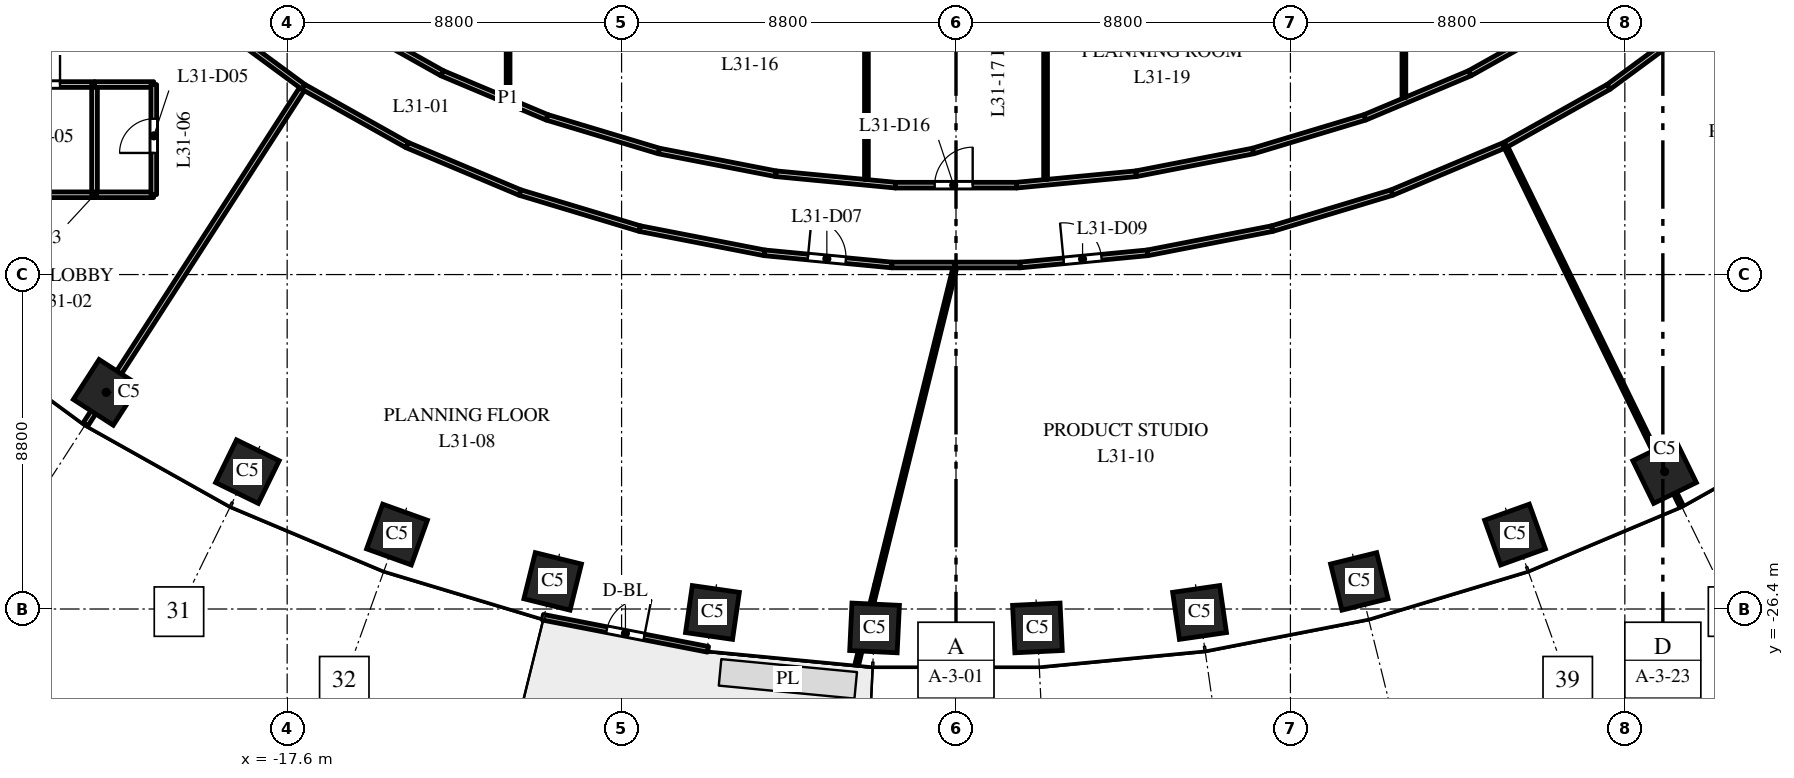
"""IFC4 building model, lengths in metres.
Left out: names, types, materials, properties, quantities, classifications, styles, units other than length and angle.
Written with IfcOpenShell. Run it as: python <this file> out.ifc"""

import sys

from ifc_helpers import new_model, si_unit, direction, frame, frame_2d, origin, origin_2d, place, context, subcontext, project, spatial, rectangle, extrude, element, fill, save


model = new_model("IFC4")
c1 = context("Model", 3, precision=1e-05, world=origin(), true_north=direction((0.0, 1.0)))
c2 = subcontext(c1, "Body", "Model", "MODEL_VIEW")
j1 = project(units=[si_unit("LENGTHUNIT", "METRE"), si_unit("PLANEANGLEUNIT", "RADIAN")], contexts=[c1])
p1 = place(None, origin())
s1 = spatial("IfcSite", under=j1, at=p1, CompositionType="ELEMENT")
p2 = place(p1, origin())
s2 = spatial("IfcBuilding", under=s1, at=p2, CompositionType="ELEMENT")
p3 = place(p2, frame((0.0, 0.0, 136.0)))
s3 = spatial("IfcBuildingStorey", under=s2, at=p3, CompositionType="ELEMENT", Elevation=136.0)
for number, where, z_axis, x_axis in (
    (1, (-22.362, -20.7, 0.0), (0.0, 0.0, 1.0), (0.84, -0.542, 0.0)),
    (2, (-18.646, -22.785, 0.0), (0.0, 0.0, 1.0), (0.898, -0.439, 0.0)),
    (3, (-14.709, -24.441, 0.0), (0.0, 0.0, 1.0), (0.941, -0.338, 0.0)),
    (4, (-10.613, -25.674, 0.0), (0.0, 0.0, 1.0), (0.971, -0.24, 0.0)),
    (5, (-6.409, -26.491, 0.0), (0.0, 0.0, 1.0), (0.99, -0.143, 0.0)),
    (6, (-2.143, -26.898, 0.0), (0.0, 0.0, 1.0), (0.999, -0.048, 0.0)),
    (7, (2.143, -26.898, 0.0), (0.0, 0.0, 1.0), (0.999, 0.048, 0.0)),
    (8, (6.409, -26.491, 0.0), (0.0, 0.0, 1.0), (0.99, 0.143, 0.0)),
    (9, (10.613, -25.674, 0.0), (0.0, 0.0, 1.0), (0.971, 0.24, 0.0)),
    (10, (14.709, -24.441, 0.0), (0.0, 0.0, 1.0), (0.941, 0.338, 0.0)),
    (11, (18.646, -22.785, 0.0), (0.0, 0.0, 1.0), (0.898, 0.439, 0.0)),
):
    element("IfcColumn", number, at=place(p3, frame(where, z_axis=z_axis, x_axis=x_axis)), inside=s3, PredefinedType="COLUMN", context=c2, shape_type="SweptSolid", body=[
        extrude(rectangle(XDim=1.25, YDim=1.25, at=origin_2d()), origin(), (0.0, 0.0, 1.0), 4.0),
    ])
p4 = place(p3, frame((-10.871, -26.617, 0.0), z_axis=(0.0, 0.0, 1.0), x_axis=(0.981631174778, -0.190788460615, 0.0)))
e12 = element("IfcWall", 12, at=p4, inside=s3, PredefinedType="STANDARD", context=c2, shape_type="SweptSolid", body=[
    extrude(rectangle(XDim=4.426, YDim=0.15, at=frame_2d((2.213, 0.0))), origin(), (0.0, 0.0, 1.0), 3.7),
])
p5 = place(p4, frame((1.713, 0.0, 0.0)))
e13 = element("IfcOpeningElement", 13, at=p5, cuts=e12, PredefinedType="OPENING", context=c2, shape_type="SweptSolid", body=[
    extrude(rectangle(XDim=1.0, YDim=2.4, at=frame_2d((0.5, 1.2))), frame((0.0, 0.085, 0.0), z_axis=(0.0, -1.0, 0.0), x_axis=(1.0, 0.0, 0.0)), (0.0, 0.0, 1.0), 0.17),
])
p6 = place(p3, frame((-32.063, -12.6, 0.0), z_axis=(0.0, 0.0, 1.0), x_axis=(1.0, 0.0, 0.0)))
e14 = element("IfcWall", 14, at=p6, inside=s3, PredefinedType="PARTITIONING", context=c2, shape_type="SweptSolid", body=[
    extrude(rectangle(XDim=9.394, YDim=0.15, at=frame_2d((4.697, 0.0))), origin(), (0.0, 0.0, 1.0), 2.9),
])
p7 = place(p6, frame((1.713, 0.0, 0.0)))
e15 = element("IfcOpeningElement", 15, at=p7, cuts=e14, PredefinedType="OPENING", context=c2, shape_type="SweptSolid", body=[
    extrude(rectangle(XDim=1.0, YDim=2.1, at=frame_2d((0.5, 1.05))), frame((0.0, 0.085, 0.0), z_axis=(0.0, -1.0, 0.0), x_axis=(1.0, 0.0, 0.0)), (0.0, 0.0, 1.0), 0.17),
])
p8 = place(p6, frame((7.486, 0.0, 0.0)))
e16 = element("IfcOpeningElement", 16, at=p8, cuts=e14, PredefinedType="OPENING", context=c2, shape_type="SweptSolid", body=[
    extrude(rectangle(XDim=1.0, YDim=2.1, at=frame_2d((0.5, 1.05))), frame((0.0, 0.085, 0.0), z_axis=(0.0, -1.0, 0.0), x_axis=(1.0, 0.0, 0.0)), (0.0, 0.0, 1.0), 0.17),
])
p9 = place(p3, frame((-29.865, -15.5, 0.0), z_axis=(0.0, 0.0, 1.0), x_axis=(1.0, 0.0, 0.0)))
e17 = element("IfcWall", 17, at=p9, inside=s3, PredefinedType="PARTITIONING", context=c2, shape_type="SweptSolid", body=[
    extrude(rectangle(XDim=7.196, YDim=0.15, at=frame_2d((3.598, 0.0))), origin(), (0.0, 0.0, 1.0), 2.9),
])
p10 = place(p9, frame((2.488, 0.0, 0.0)))
e18 = element("IfcOpeningElement", 18, at=p10, cuts=e17, PredefinedType="OPENING", context=c2, shape_type="SweptSolid", body=[
    extrude(rectangle(XDim=1.0, YDim=2.1, at=frame_2d((0.5, 1.05))), frame((0.0, 0.085, 0.0), z_axis=(0.0, -1.0, 0.0), x_axis=(1.0, 0.0, 0.0)), (0.0, 0.0, 1.0), 0.17),
])
p11 = place(p3, frame((-22.905, -21.542, 0.0), z_axis=(0.0, 0.0, 1.0), x_axis=(0.542214233103, 0.840240278385, 0.0)))
e19 = element("IfcWall", 19, at=p11, inside=s3, PredefinedType="PARTITIONING", context=c2, shape_type="SweptSolid", body=[
    extrude(rectangle(XDim=10.566, YDim=0.15, at=frame_2d((5.283, 0.0))), origin(), (0.0, 0.0, 1.0), 2.9),
])
p12 = place(p3, frame((-22.669, -15.5, 0.0), z_axis=(0.0, 0.0, 1.0), x_axis=(0.0, 1.0, 0.0)))
e20 = element("IfcWall", 20, at=p12, inside=s3, PredefinedType="PARTITIONING", context=c2, shape_type="SweptSolid", body=[
    extrude(rectangle(XDim=2.9, YDim=0.15, at=frame_2d((1.45, 0.0))), origin(), (0.0, 0.0, 1.0), 3.7),
])
p13 = place(p3, frame((-22.669, -15.5, 0.0), z_axis=(0.0, 0.0, 1.0), x_axis=(1.0, 0.0, 0.0)))
e21 = element("IfcWall", 21, at=p13, inside=s3, PredefinedType="PARTITIONING", context=c2, shape_type="SweptSolid", body=[
    extrude(rectangle(XDim=1.555, YDim=0.15, at=frame_2d((0.777, 0.0))), origin(), (0.0, 0.0, 1.0), 2.75),
])
p14 = place(p3, frame((-22.669, -12.6, 0.0), z_axis=(0.0, 0.0, 1.0), x_axis=(1.0, 0.0, 0.0)))
e22 = element("IfcWall", 22, at=p14, inside=s3, PredefinedType="PARTITIONING", context=c2, shape_type="SweptSolid", body=[
    extrude(rectangle(XDim=1.559, YDim=0.15, at=frame_2d((0.779, 0.0))), origin(), (0.0, 0.0, 1.0), 3.7),
])
p15 = place(p3, frame((-21.11, -15.496, 0.0), z_axis=(0.0, 0.0, 1.0), x_axis=(0.0, 1.0, 0.0)))
e23 = element("IfcWall", 23, at=p15, inside=s3, PredefinedType="PARTITIONING", context=c2, shape_type="SweptSolid", body=[
    extrude(rectangle(XDim=2.896, YDim=0.15, at=frame_2d((1.448, 0.0))), origin(), (0.0, 0.0, 1.0), 2.75),
])
p16 = place(p15, frame((1.096, 0.0, 0.0)))
e24 = element("IfcOpeningElement", 24, at=p16, cuts=e23, PredefinedType="OPENING", context=c2, shape_type="SweptSolid", body=[
    extrude(rectangle(XDim=0.9, YDim=2.1, at=frame_2d((0.45, 1.05))), frame((0.0, 0.085, 0.0), z_axis=(0.0, -1.0, 0.0), x_axis=(1.0, 0.0, 0.0)), (0.0, 0.0, 1.0), 0.17),
])
p17 = place(p3, frame((-19.595, -10.877, 0.0), z_axis=(0.0, 0.0, 1.0), x_axis=(0.805151708762, -0.593068904831, 0.0)))
e25 = element("IfcWall", 25, at=p17, inside=s3, PredefinedType="PARTITIONING", context=c2, shape_type="SweptSolid", body=[
    extrude(rectangle(XDim=3.008, YDim=0.15, at=frame_2d((1.504, 0.0))), origin(), (0.0, 0.0, 1.0), 2.75),
])
p18 = place(p3, frame((-17.173, -12.661, 0.0), z_axis=(0.0, 0.0, 1.0), x_axis=(0.872054495499, -0.489408783003, 0.0)))
e26 = element("IfcWall", 26, at=p18, inside=s3, PredefinedType="PARTITIONING", context=c2, shape_type="SweptSolid", body=[
    extrude(rectangle(XDim=3.128, YDim=0.15, at=frame_2d((1.564, 0.0))), origin(), (0.0, 0.0, 1.0), 3.7),
])
p19 = place(p3, frame((-16.032, -10.893, 0.0), z_axis=(0.0, 0.0, 1.0), x_axis=(0.871948863789, -0.489596955604, 0.0)))
e27 = element("IfcWall", 27, at=p19, inside=s3, PredefinedType="PARTITIONING", context=c2, shape_type="SweptSolid", body=[
    extrude(rectangle(XDim=2.88, YDim=0.15, at=frame_2d((1.44, 0.0))), origin(), (0.0, 0.0, 1.0), 2.75),
])
p20 = place(p3, frame((-14.445, -14.192, 0.0), z_axis=(0.0, 0.0, 1.0), x_axis=(0.921794929211, -0.387677841101, 0.0)))
e28 = element("IfcWall", 28, at=p20, inside=s3, PredefinedType="PARTITIONING", context=c2, shape_type="SweptSolid", body=[
    extrude(rectangle(XDim=3.224, YDim=0.15, at=frame_2d((1.612, 0.0))), origin(), (0.0, 0.0, 1.0), 2.85),
])
p21 = place(p3, frame((-13.521, -12.303, 0.0), z_axis=(0.0, 0.0, 1.0), x_axis=(0.921848667289, -0.387550041438, 0.0)))
e29 = element("IfcWall", 29, at=p21, inside=s3, PredefinedType="PARTITIONING", context=c2, shape_type="SweptSolid", body=[
    extrude(rectangle(XDim=2.993, YDim=0.15, at=frame_2d((1.497, 0.0))), origin(), (0.0, 0.0, 1.0), 2.85),
])
p22 = place(p3, frame((-11.786, -12.947, 0.0), z_axis=(0.0, 0.0, 1.0), x_axis=(0.0, 1.0, 0.0)))
e30 = element("IfcWall", 30, at=p22, inside=s3, PredefinedType="PARTITIONING", context=c2, shape_type="SweptSolid", body=[
    extrude(rectangle(XDim=25.894, YDim=0.1, at=frame_2d((12.947, 0.0))), origin(), (0.0, 0.0, 1.0), 2.75),
])
p23 = place(p3, frame((-11.473, -15.442, 0.0), z_axis=(0.0, 0.0, 1.0), x_axis=(0.957544199748, -0.288286499041, 0.0)))
e31 = element("IfcWall", 31, at=p23, inside=s3, PredefinedType="PARTITIONING", context=c2, shape_type="SweptSolid", body=[
    extrude(rectangle(XDim=3.293, YDim=0.15, at=frame_2d((1.646, 0.0))), origin(), (0.0, 0.0, 1.0), 3.7),
])
p24 = place(p3, frame((-10.762, -13.463, 0.0), z_axis=(0.0, 0.0, 1.0), x_axis=(0.957609782402, -0.288068576292, 0.0)))
e32 = element("IfcWall", 32, at=p24, inside=s3, PredefinedType="PARTITIONING", context=c2, shape_type="SweptSolid", body=[
    extrude(rectangle(XDim=3.076, YDim=0.15, at=frame_2d((1.538, 0.0))), origin(), (0.0, 0.0, 1.0), 3.7),
])
p25 = place(p3, frame((-8.32, -16.391, 0.0), z_axis=(0.0, 0.0, 1.0), x_axis=(0.981650748697, -0.190687722683, 0.0)))
e33 = element("IfcWall", 33, at=p25, inside=s3, PredefinedType="PARTITIONING", context=c2, shape_type="SweptSolid", body=[
    extrude(rectangle(XDim=3.34, YDim=0.15, at=frame_2d((1.67, 0.0))), origin(), (0.0, 0.0, 1.0), 2.85),
])
p26 = place(p3, frame((-7.816, -14.349, 0.0), z_axis=(0.0, 0.0, 1.0), x_axis=(0.981627147181, -0.190809181955, 0.0)))
e34 = element("IfcWall", 34, at=p26, inside=s3, PredefinedType="PARTITIONING", context=c2, shape_type="SweptSolid", body=[
    extrude(rectangle(XDim=3.134, YDim=0.15, at=frame_2d((1.567, 0.0))), origin(), (0.0, 0.0, 1.0), 2.85),
])
p27 = place(p3, frame((-5.041, -17.028, 0.0), z_axis=(0.0, 0.0, 1.0), x_axis=(0.99548178004, -0.094952754613, 0.0)))
e35 = element("IfcWall", 35, at=p27, inside=s3, PredefinedType="PARTITIONING", context=c2, shape_type="SweptSolid", body=[
    extrude(rectangle(XDim=3.368, YDim=0.15, at=frame_2d((1.684, 0.0))), origin(), (0.0, 0.0, 1.0), 3.7),
])
p28 = place(p27, frame((1.15, 0.0, 0.0)))
e36 = element("IfcOpeningElement", 36, at=p28, cuts=e35, PredefinedType="OPENING", context=c2, shape_type="SweptSolid", body=[
    extrude(rectangle(XDim=1.0, YDim=2.1, at=frame_2d((0.5, 1.05))), frame((0.0, 0.085, 0.0), z_axis=(0.0, -1.0, 0.0), x_axis=(1.0, 0.0, 0.0)), (0.0, 0.0, 1.0), 0.17),
])
p29 = place(p3, frame((-4.74, -14.947, 0.0), z_axis=(0.0, 0.0, 1.0), x_axis=(0.995467349369, -0.095103923894, 0.0)))
e37 = element("IfcWall", 37, at=p29, inside=s3, PredefinedType="PARTITIONING", context=c2, shape_type="SweptSolid", body=[
    extrude(rectangle(XDim=3.165, YDim=0.15, at=frame_2d((1.583, 0.0))), origin(), (0.0, 0.0, 1.0), 3.7),
])
p30 = place(p3, frame((-2.609, -27.858, 0.0), z_axis=(0.0, 0.0, 1.0), x_axis=(0.239863692272, 0.970806576579, 0.0)))
e38 = element("IfcWall", 38, at=p30, inside=s3, PredefinedType="PARTITIONING", context=c2, shape_type="SweptSolid", body=[
    extrude(rectangle(XDim=2.151, YDim=0.1, at=frame_2d((1.075, 0.0))), origin(), (0.0, 0.0, 1.0), 2.85),
])
p31 = place(p3, frame((-2.357, -15.096, 0.0), z_axis=(0.0, 0.0, 1.0), x_axis=(0.0, 1.0, 0.0)))
e39 = element("IfcWall", 39, at=p31, inside=s3, PredefinedType="PARTITIONING", context=c2, shape_type="SweptSolid", body=[
    extrude(rectangle(XDim=7.886, YDim=0.1, at=frame_2d((3.943, 0.0))), origin(), (0.0, 0.0, 1.0), 2.9),
])
p32 = place(p3, frame((-2.088, -25.749, 0.0), z_axis=(0.0, 0.0, 1.0), x_axis=(0.239779759728, 0.970827310506, 0.0)))
e40 = element("IfcWall", 40, at=p32, inside=s3, PredefinedType="PARTITIONING", context=c2, shape_type="SweptSolid", body=[
    extrude(rectangle(XDim=8.654, YDim=0.1, at=frame_2d((4.327, 0.0))), origin(), (0.0, 0.0, 1.0), 2.85),
])
p33 = place(p3, frame((-1.688, -17.348, 0.0), z_axis=(0.0, 0.0, 1.0), x_axis=(1.0, 0.0, 0.0)))
e41 = element("IfcWall", 41, at=p33, inside=s3, PredefinedType="PARTITIONING", context=c2, shape_type="SweptSolid", body=[
    extrude(rectangle(XDim=1.658, YDim=0.15, at=frame_2d((0.829, 0.0))), origin(), (0.0, 0.0, 1.0), 2.85),
])
p34 = place(p3, frame((-1.589, -15.248, 0.0), z_axis=(0.0, 0.0, 1.0), x_axis=(1.0, 0.0, 0.0)))
e42 = element("IfcWall", 42, at=p34, inside=s3, PredefinedType="PARTITIONING", context=c2, shape_type="SweptSolid", body=[
    extrude(rectangle(XDim=3.178, YDim=0.15, at=frame_2d((1.589, 0.0))), origin(), (0.0, 0.0, 1.0), 2.85),
])
p35 = place(p34, frame((1.028, 0.0, 0.0)))
e43 = element("IfcOpeningElement", 43, at=p35, cuts=e42, PredefinedType="OPENING", context=c2, shape_type="SweptSolid", body=[
    extrude(rectangle(XDim=1.0, YDim=2.1, at=frame_2d((0.5, 1.05))), frame((0.0, 0.085, 0.0), z_axis=(0.0, -1.0, 0.0), x_axis=(1.0, 0.0, 0.0)), (0.0, 0.0, 1.0), 0.17),
])
p36 = place(p3, frame((-0.013, -17.348, 0.0), z_axis=(0.0, 0.0, 1.0), x_axis=(1.0, 0.0, 0.0)))
e44 = element("IfcWall", 44, at=p36, inside=s3, PredefinedType="PARTITIONING", context=c2, shape_type="SweptSolid", body=[
    extrude(rectangle(XDim=1.701, YDim=0.15, at=frame_2d((0.851, 0.0))), origin(), (0.0, 0.0, 1.0), 3.7),
])
p37 = place(p3, frame((1.589, -15.248, 0.0), z_axis=(0.0, 0.0, 1.0), x_axis=(0.995467349369, 0.095103923894, 0.0)))
e45 = element("IfcWall", 45, at=p37, inside=s3, PredefinedType="PARTITIONING", context=c2, shape_type="SweptSolid", body=[
    extrude(rectangle(XDim=3.165, YDim=0.15, at=frame_2d((1.583, 0.0))), origin(), (0.0, 0.0, 1.0), 2.85),
])
p38 = place(p3, frame((1.688, -17.348, 0.0), z_axis=(0.0, 0.0, 1.0), x_axis=(0.99548178004, 0.094952754613, 0.0)))
e46 = element("IfcWall", 46, at=p38, inside=s3, PredefinedType="PARTITIONING", context=c2, shape_type="SweptSolid", body=[
    extrude(rectangle(XDim=3.368, YDim=0.15, at=frame_2d((1.684, 0.0))), origin(), (0.0, 0.0, 1.0), 2.85),
])
p39 = place(p38, frame((1.15, 0.0, 0.0)))
e47 = element("IfcOpeningElement", 47, at=p39, cuts=e46, PredefinedType="OPENING", context=c2, shape_type="SweptSolid", body=[
    extrude(rectangle(XDim=1.0, YDim=2.1, at=frame_2d((0.5, 1.05))), frame((0.0, 0.085, 0.0), z_axis=(0.0, -1.0, 0.0), x_axis=(1.0, 0.0, 0.0)), (0.0, 0.0, 1.0), 0.17),
])
p40 = place(p3, frame((2.357, -15.096, 0.0), z_axis=(0.0, 0.0, 1.0), x_axis=(0.0, 1.0, 0.0)))
e48 = element("IfcWall", 48, at=p40, inside=s3, PredefinedType="PARTITIONING", context=c2, shape_type="SweptSolid", body=[
    extrude(rectangle(XDim=7.886, YDim=0.1, at=frame_2d((3.943, 0.0))), origin(), (0.0, 0.0, 1.0), 2.85),
])
p41 = place(p3, frame((4.74, -14.947, 0.0), z_axis=(0.0, 0.0, 1.0), x_axis=(0.981627147181, 0.190809181955, 0.0)))
e49 = element("IfcWall", 49, at=p41, inside=s3, PredefinedType="PARTITIONING", context=c2, shape_type="SweptSolid", body=[
    extrude(rectangle(XDim=3.134, YDim=0.15, at=frame_2d((1.567, 0.0))), origin(), (0.0, 0.0, 1.0), 3.7),
])
p42 = place(p3, frame((5.041, -17.028, 0.0), z_axis=(0.0, 0.0, 1.0), x_axis=(0.981650748697, 0.190687722683, 0.0)))
e50 = element("IfcWall", 50, at=p42, inside=s3, PredefinedType="PARTITIONING", context=c2, shape_type="SweptSolid", body=[
    extrude(rectangle(XDim=3.34, YDim=0.15, at=frame_2d((1.67, 0.0))), origin(), (0.0, 0.0, 1.0), 3.7),
])
p43 = place(p3, frame((7.816, -14.349, 0.0), z_axis=(0.0, 0.0, 1.0), x_axis=(0.957609782402, 0.288068576292, 0.0)))
e51 = element("IfcWall", 51, at=p43, inside=s3, PredefinedType="PARTITIONING", context=c2, shape_type="SweptSolid", body=[
    extrude(rectangle(XDim=3.076, YDim=0.15, at=frame_2d((1.538, 0.0))), origin(), (0.0, 0.0, 1.0), 2.85),
])
p44 = place(p3, frame((8.32, -16.391, 0.0), z_axis=(0.0, 0.0, 1.0), x_axis=(0.957544199748, 0.288286499041, 0.0)))
e52 = element("IfcWall", 52, at=p44, inside=s3, PredefinedType="PARTITIONING", context=c2, shape_type="SweptSolid", body=[
    extrude(rectangle(XDim=3.293, YDim=0.15, at=frame_2d((1.646, 0.0))), origin(), (0.0, 0.0, 1.0), 2.85),
])
p45 = place(p3, frame((10.762, -13.463, 0.0), z_axis=(0.0, 0.0, 1.0), x_axis=(0.921848667289, 0.387550041438, 0.0)))
e53 = element("IfcWall", 53, at=p45, inside=s3, PredefinedType="PARTITIONING", context=c2, shape_type="SweptSolid", body=[
    extrude(rectangle(XDim=2.993, YDim=0.15, at=frame_2d((1.497, 0.0))), origin(), (0.0, 0.0, 1.0), 3.7),
])
p46 = place(p3, frame((11.473, -15.442, 0.0), z_axis=(0.0, 0.0, 1.0), x_axis=(0.921794929211, 0.387677841101, 0.0)))
e54 = element("IfcWall", 54, at=p46, inside=s3, PredefinedType="PARTITIONING", context=c2, shape_type="SweptSolid", body=[
    extrude(rectangle(XDim=3.224, YDim=0.15, at=frame_2d((1.612, 0.0))), origin(), (0.0, 0.0, 1.0), 3.7),
])
p47 = place(p3, frame((11.786, -12.947, 0.0), z_axis=(0.0, 0.0, 1.0), x_axis=(0.0, 1.0, 0.0)))
e55 = element("IfcWall", 55, at=p47, inside=s3, PredefinedType="PARTITIONING", context=c2, shape_type="SweptSolid", body=[
    extrude(rectangle(XDim=25.894, YDim=0.1, at=frame_2d((12.947, 0.0))), origin(), (0.0, 0.0, 1.0), 2.75),
])
p48 = place(p3, frame((13.521, -12.303, 0.0), z_axis=(0.0, 0.0, 1.0), x_axis=(0.871948863789, 0.489596955604, 0.0)))
e56 = element("IfcWall", 56, at=p48, inside=s3, PredefinedType="PARTITIONING", context=c2, shape_type="SweptSolid", body=[
    extrude(rectangle(XDim=2.88, YDim=0.15, at=frame_2d((1.44, 0.0))), origin(), (0.0, 0.0, 1.0), 3.7),
])
p49 = place(p3, frame((14.447, -14.196, 0.0), z_axis=(0.0, 0.0, 1.0), x_axis=(0.439198109491, -0.898390238493, 0.0)))
e57 = element("IfcWall", 57, at=p49, inside=s3, PredefinedType="PARTITIONING", context=c2, shape_type="SweptSolid", body=[
    extrude(rectangle(XDim=10.562, YDim=0.1, at=frame_2d((5.281, 0.0))), origin(), (0.0, 0.0, 1.0), 2.9),
])
p50 = place(p3, frame((14.462, -14.182, 0.0), z_axis=(0.0, 0.0, 1.0), x_axis=(0.872130780857, 0.489272828882, 0.0)))
e58 = element("IfcWall", 58, at=p50, inside=s3, PredefinedType="PARTITIONING", context=c2, shape_type="SweptSolid", body=[
    extrude(rectangle(XDim=3.109, YDim=0.15, at=frame_2d((1.554, 0.0))), origin(), (0.0, 0.0, 1.0), 3.7),
])
p51 = place(p3, frame((17.173, -12.661, 0.0), z_axis=(0.0, 0.0, 1.0), x_axis=(0.805151708762, 0.593068904831, 0.0)))
e59 = element("IfcWall", 59, at=p51, inside=s3, PredefinedType="PARTITIONING", context=c2, shape_type="SweptSolid", body=[
    extrude(rectangle(XDim=3.008, YDim=0.15, at=frame_2d((1.504, 0.0))), origin(), (0.0, 0.0, 1.0), 3.7),
])
p52 = place(p5, origin())
e60 = element("IfcDoor", 60, at=p52, inside=s3, OperationType="SINGLE_SWING_RIGHT", PredefinedType="DOOR", context=c2, shape_type="SweptSolid", body=[
    extrude(rectangle(XDim=1.0, YDim=2.4, at=frame_2d((0.5, 1.2))), frame((0.0, 0.025, 0.0), z_axis=(0.0, -1.0, 0.0), x_axis=(1.0, 0.0, 0.0)), (0.0, 0.0, 1.0), 0.05),
])
fill(e13, e60)
p53 = place(p8, origin())
e61 = element("IfcDoor", 61, at=p53, inside=s3, OperationType="SINGLE_SWING_RIGHT", PredefinedType="DOOR", context=c2, shape_type="SweptSolid", body=[
    extrude(rectangle(XDim=1.0, YDim=2.1, at=frame_2d((0.5, 1.05))), frame((0.0, 0.025, 0.0), z_axis=(0.0, -1.0, 0.0), x_axis=(1.0, 0.0, 0.0)), (0.0, 0.0, 1.0), 0.05),
])
fill(e16, e61)
p54 = place(p16, origin())
e62 = element("IfcDoor", 62, at=p54, inside=s3, OperationType="SINGLE_SWING_LEFT", PredefinedType="DOOR", context=c2, shape_type="SweptSolid", body=[
    extrude(rectangle(XDim=0.9, YDim=2.1, at=frame_2d((0.45, 1.05))), frame((0.0, 0.025, 0.0), z_axis=(0.0, -1.0, 0.0), x_axis=(1.0, 0.0, 0.0)), (0.0, 0.0, 1.0), 0.05),
])
fill(e24, e62)
p55 = place(p28, origin())
e63 = element("IfcDoor", 63, at=p55, inside=s3, OperationType="SINGLE_SWING_LEFT", PredefinedType="DOOR", context=c2, shape_type="SweptSolid", body=[
    extrude(rectangle(XDim=1.0, YDim=2.1, at=frame_2d((0.5, 1.05))), frame((0.0, 0.025, 0.0), z_axis=(0.0, -1.0, 0.0), x_axis=(1.0, 0.0, 0.0)), (0.0, 0.0, 1.0), 0.05),
])
fill(e36, e63)
p56 = place(p39, origin())
e64 = element("IfcDoor", 64, at=p56, inside=s3, OperationType="SINGLE_SWING_LEFT", PredefinedType="DOOR", context=c2, shape_type="SweptSolid", body=[
    extrude(rectangle(XDim=1.0, YDim=2.1, at=frame_2d((0.5, 1.05))), frame((0.0, 0.025, 0.0), z_axis=(0.0, -1.0, 0.0), x_axis=(1.0, 0.0, 0.0)), (0.0, 0.0, 1.0), 0.05),
])
fill(e47, e64)
p57 = place(p35, origin())
e65 = element("IfcDoor", 65, at=p57, inside=s3, OperationType="SINGLE_SWING_RIGHT", PredefinedType="DOOR", context=c2, shape_type="SweptSolid", body=[
    extrude(rectangle(XDim=1.0, YDim=2.1, at=frame_2d((0.5, 1.05))), frame((0.0, 0.025, 0.0), z_axis=(0.0, -1.0, 0.0), x_axis=(1.0, 0.0, 0.0)), (0.0, 0.0, 1.0), 0.05),
])
fill(e43, e65)
save(model, sys.argv[1])
